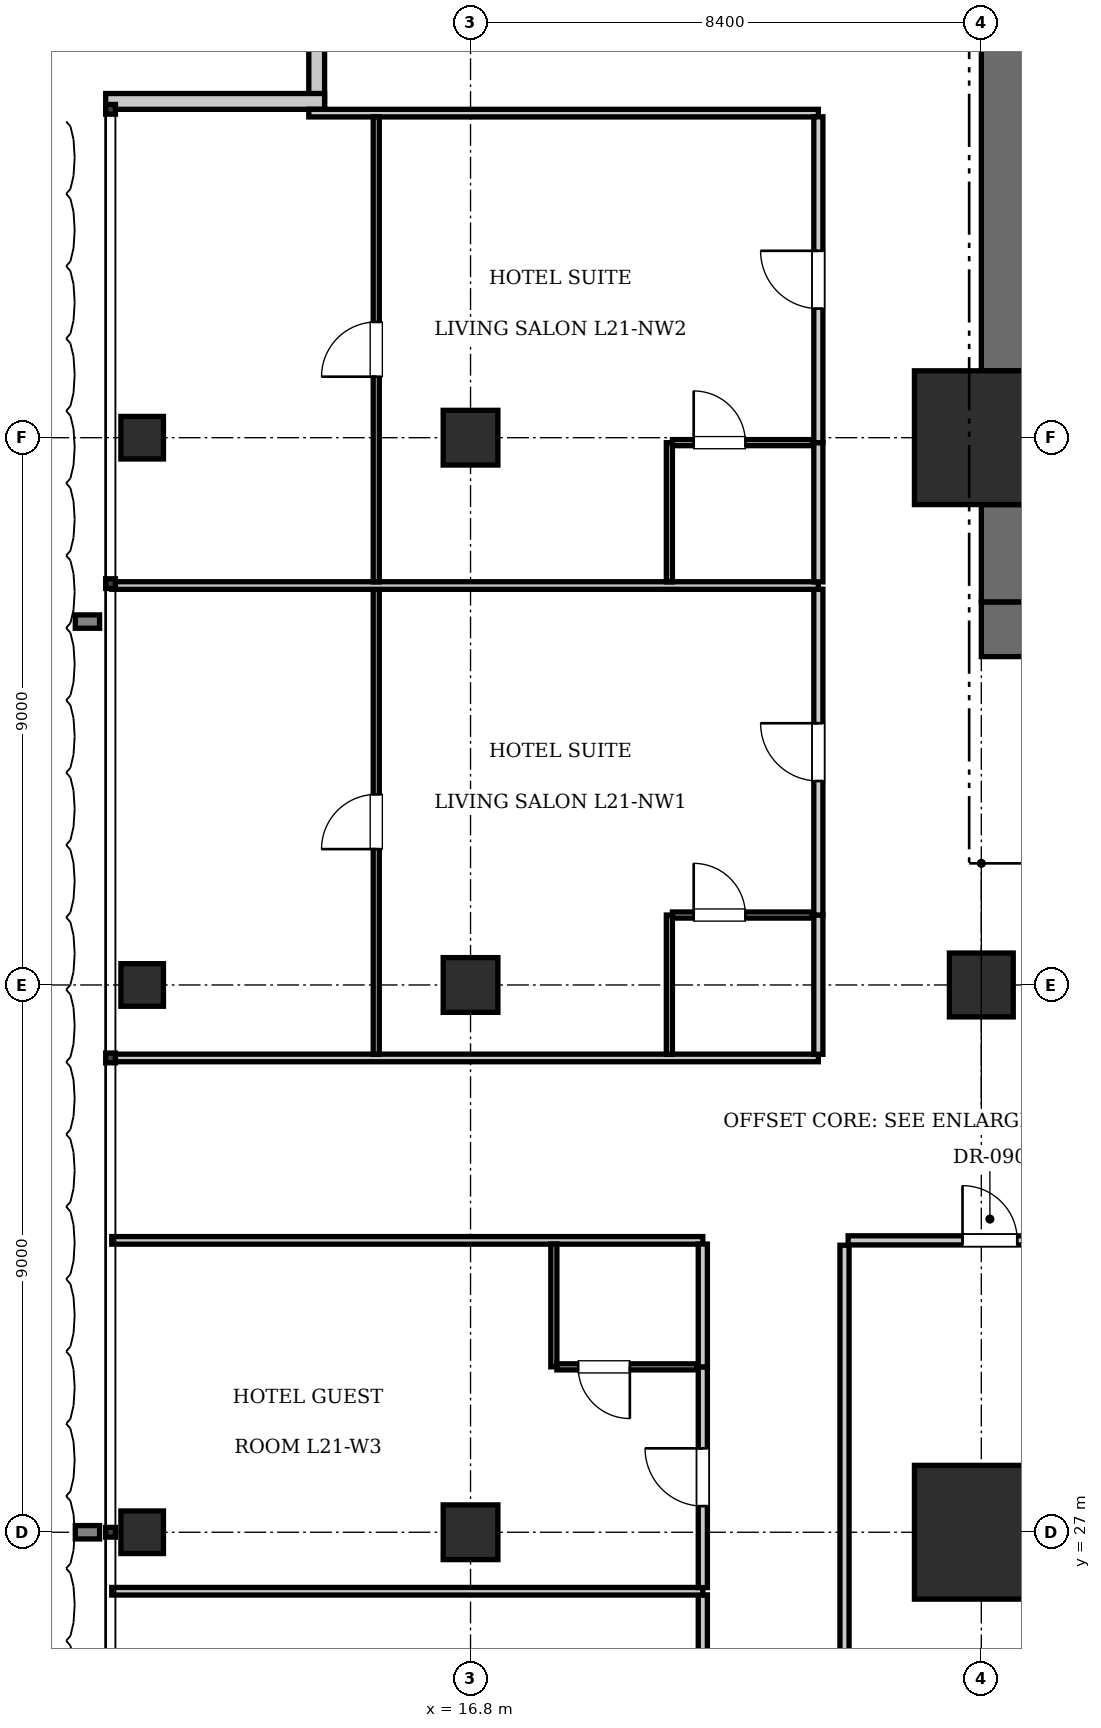
"""IFC4 building model, lengths in metres.
Left out: names, types, materials, properties, quantities, classifications, styles, units other than length and angle.
Written with IfcOpenShell. Run it as: python <this file> out.ifc"""

import sys

from ifc_helpers import new_model, si_unit, direction, frame, frame_2d, origin, origin_2d, place, context, subcontext, project, spatial, rectangle, i_section, extrude, element, fill, save


model = new_model("IFC4")
c1 = context("Model", 3, precision=1e-05, world=origin(), true_north=direction((0.0, 1.0)))
c2 = subcontext(c1, "Body", "Model", "MODEL_VIEW")
j1 = project(units=[si_unit("LENGTHUNIT", "METRE"), si_unit("PLANEANGLEUNIT", "RADIAN")], contexts=[c1])
p1 = place(None, origin())
s1 = spatial("IfcSite", under=j1, at=p1, CompositionType="ELEMENT")
p2 = place(p1, origin())
s2 = spatial("IfcBuilding", under=s1, at=p2, CompositionType="ELEMENT")
p3 = place(p2, frame((0.0, 0.0, 88.55)))
s3 = spatial("IfcBuildingStorey", under=s2, at=p3, CompositionType="ELEMENT", Elevation=88.55)
for number, where, z_axis, x_axis in (
    (1, (25.2, 27.0, 0.0), (0.0, 0.0, 1.0), (1.0, 0.0, 0.0)),
    (2, (25.2, 45.0, 0.0), (0.0, 0.0, 1.0), (1.0, 0.0, 0.0)),
):
    element("IfcColumn", number, at=place(p3, frame(where, z_axis=z_axis, x_axis=x_axis)), inside=s3, PredefinedType="COLUMN", context=c2, shape_type="SweptSolid", body=[
        extrude(rectangle(XDim=2.2, YDim=2.2, at=origin_2d()), origin(), (0.0, 0.0, 1.0), 3.85),
    ])
p4 = place(p3, frame((25.2, 41.85, 0.0), z_axis=(0.0, 0.0, 1.0), x_axis=(1.0, 0.0, 0.0)))
e3 = element("IfcWall", 3, at=p4, inside=s3, PredefinedType="SHEAR", context=c2, shape_type="SweptSolid", body=[
    extrude(rectangle(XDim=6.8, YDim=0.9, at=frame_2d((3.4, 0.0))), origin(), (0.0, 0.0, 1.0), 3.85),
])
p5 = place(p4, frame((1.65, 0.0, 0.0)))
e4 = element("IfcOpeningElement", 4, at=p5, cuts=e3, PredefinedType="OPENING", context=c2, shape_type="SweptSolid", body=[
    extrude(rectangle(XDim=1.15, YDim=2.15, at=frame_2d((0.575, 1.075))), frame((0.0, 0.46, 0.0), z_axis=(0.0, -1.0, 0.0), x_axis=(1.0, 0.0, 0.0)), (0.0, 0.0, 1.0), 0.92),
])
p6 = place(p4, frame((5.15, 0.0, 0.0)))
e5 = element("IfcOpeningElement", 5, at=p6, cuts=e3, PredefinedType="OPENING", context=c2, shape_type="SweptSolid", body=[
    extrude(rectangle(XDim=1.1, YDim=2.2, at=frame_2d((0.55, 1.1))), frame((0.0, 0.46, 0.0), z_axis=(0.0, -1.0, 0.0), x_axis=(1.0, 0.0, 0.0)), (0.0, 0.0, 1.0), 0.92),
])
p7 = place(p3, frame((25.65, 42.3, 0.0), z_axis=(0.0, 0.0, 1.0), x_axis=(0.0, 1.0, 0.0)))
e6 = element("IfcWall", 6, at=p7, inside=s3, PredefinedType="SHEAR", context=c2, shape_type="SweptSolid", body=[
    extrude(rectangle(XDim=1.6, YDim=0.9, at=frame_2d((0.8, 0.0))), origin(), (0.0, 0.0, 1.0), 3.85),
])
p8 = place(p3, frame((25.65, 46.1, 0.0), z_axis=(0.0, 0.0, 1.0), x_axis=(0.0, 1.0, 0.0)))
e7 = element("IfcWall", 7, at=p8, inside=s3, PredefinedType="SHEAR", context=c2, shape_type="SweptSolid", body=[
    extrude(rectangle(XDim=7.0, YDim=0.9, at=frame_2d((3.5, 0.0))), origin(), (0.0, 0.0, 1.0), 3.85),
])
p9 = place(p3, frame((25.2, 36.0, 0.0), z_axis=(0.0, 0.0, 1.0), x_axis=(1.0, 0.0, 0.0)))
e8 = element("IfcColumn", 8, at=p9, inside=s3, PredefinedType="COLUMN", context=c2, shape_type="SweptSolid", body=[
    extrude(rectangle(XDim=1.05, YDim=1.05, at=origin_2d()), origin(), (0.0, 0.0, 1.0), 3.85),
])
for number, where, z_axis, x_axis in (
    (9, (16.8, 27.0, 0.0), (0.0, 0.0, 1.0), (1.0, 0.0, 0.0)),
    (10, (16.8, 36.0, 0.0), (0.0, 0.0, 1.0), (1.0, 0.0, 0.0)),
    (11, (16.8, 45.0, 0.0), (0.0, 0.0, 1.0), (1.0, 0.0, 0.0)),
):
    element("IfcColumn", number, at=place(p3, frame(where, z_axis=z_axis, x_axis=x_axis)), inside=s3, PredefinedType="COLUMN", context=c2, shape_type="SweptSolid", body=[
        extrude(rectangle(XDim=0.9, YDim=0.9, at=origin_2d()), origin(), (0.0, 0.0, 1.0), 3.85),
    ])
for number, where, z_axis, x_axis in (
    (12, (11.4, 27.0, 0.0), (0.0, 0.0, 1.0), (1.0, 0.0, 0.0)),
    (13, (11.4, 36.0, 0.0), (0.0, 0.0, 1.0), (1.0, 0.0, 0.0)),
    (14, (11.4, 45.0, 0.0), (0.0, 0.0, 1.0), (1.0, 0.0, 0.0)),
):
    element("IfcColumn", number, at=place(p3, frame(where, z_axis=z_axis, x_axis=x_axis)), inside=s3, PredefinedType="COLUMN", context=c2, shape_type="SweptSolid", body=[
        extrude(i_section(OverallWidth=0.7, OverallDepth=0.7, WebThickness=0.028, FlangeThickness=0.044, at=origin_2d()), origin(), (0.0, 0.0, 1.0), 3.85),
    ])
p10 = place(p3, frame((14.27, 50.4, 0.0), z_axis=(0.0, 0.0, 1.0), x_axis=(0.0, 1.0, 0.0)))
e15 = element("IfcWall", 15, at=p10, inside=s3, PredefinedType="SOLIDWALL", context=c2, shape_type="SweptSolid", body=[
    extrude(rectangle(XDim=3.6, YDim=0.26, at=frame_2d((1.8, 0.0))), origin(), (0.0, 0.0, 1.0), 3.61),
])
p11 = place(p3, frame((10.8, 50.53, 0.0), z_axis=(0.0, 0.0, 1.0), x_axis=(1.0, 0.0, 0.0)))
e16 = element("IfcWall", 16, at=p11, inside=s3, PredefinedType="SOLIDWALL", context=c2, shape_type="SweptSolid", body=[
    extrude(rectangle(XDim=3.6, YDim=0.26, at=frame_2d((1.8, 0.0))), origin(), (0.0, 0.0, 1.0), 3.61),
])
p12 = place(p3, frame((22.95, 23.28, 0.0), z_axis=(0.0, 0.0, 1.0), x_axis=(0.0, 1.0, 0.0)))
e17 = element("IfcWall", 17, at=p12, inside=s3, PredefinedType="PARTITIONING", context=c2, shape_type="SweptSolid", body=[
    extrude(rectangle(XDim=8.44, YDim=0.15, at=frame_2d((4.22, 0.0))), origin(), (0.0, 0.0, 1.0), 3.61),
])
p13 = place(p3, frame((23.01, 31.8, 0.0), z_axis=(0.0, 0.0, 1.0), x_axis=(1.0, 0.0, 0.0)))
e18 = element("IfcWall", 18, at=p13, inside=s3, PredefinedType="PARTITIONING", context=c2, shape_type="SweptSolid", body=[
    extrude(rectangle(XDim=4.662, YDim=0.15, at=frame_2d((2.331, 0.0))), origin(), (0.0, 0.0, 1.0), 3.61),
])
p14 = place(p13, frame((1.881, 0.0, 0.0)))
e19 = element("IfcOpeningElement", 19, at=p14, cuts=e18, PredefinedType="OPENING", context=c2, shape_type="SweptSolid", body=[
    extrude(rectangle(XDim=0.9, YDim=2.1, at=frame_2d((0.45, 1.05))), frame((0.0, 0.085, 0.0), z_axis=(0.0, -1.0, 0.0), x_axis=(1.0, 0.0, 0.0)), (0.0, 0.0, 1.0), 0.17),
])
p15 = place(p3, frame((10.9, 31.8, 0.0), z_axis=(0.0, 0.0, 1.0), x_axis=(1.0, 0.0, 0.0)))
e20 = element("IfcWall", 20, at=p15, inside=s3, PredefinedType="PARTITIONING", context=c2, shape_type="SweptSolid", body=[
    extrude(rectangle(XDim=9.72, YDim=0.125, at=frame_2d((4.86, 0.0))), origin(), (0.0, 0.0, 1.0), 3.61),
])
p16 = place(p3, frame((20.62, 22.34, 0.0), z_axis=(0.0, 0.0, 1.0), x_axis=(0.0, 1.0, 0.0)))
e21 = element("IfcWall", 21, at=p16, inside=s3, PredefinedType="PARTITIONING", context=c2, shape_type="SweptSolid", body=[
    extrude(rectangle(XDim=3.63, YDim=0.15, at=frame_2d((1.815, 0.0))), origin(), (0.0, 0.0, 1.0), 3.61),
])
p17 = place(p16, frame((1.34, 0.0, 0.0)))
e22 = element("IfcOpeningElement", 22, at=p17, cuts=e21, PredefinedType="OPENING", context=c2, shape_type="SweptSolid", body=[
    extrude(rectangle(XDim=0.95, YDim=2.15, at=frame_2d((0.475, 1.075))), frame((0.0, 0.085, 0.0), z_axis=(0.0, -1.0, 0.0), x_axis=(1.0, 0.0, 0.0)), (0.0, 0.0, 1.0), 0.17),
])
p18 = place(p3, frame((10.9, 26.03, 0.0), z_axis=(0.0, 0.0, 1.0), x_axis=(1.0, 0.0, 0.0)))
e23 = element("IfcWall", 23, at=p18, inside=s3, PredefinedType="PARTITIONING", context=c2, shape_type="SweptSolid", body=[
    extrude(rectangle(XDim=9.72, YDim=0.125, at=frame_2d((4.86, 0.0))), origin(), (0.0, 0.0, 1.0), 3.61),
])
p19 = place(p3, frame((20.62, 26.09, 0.0), z_axis=(0.0, 0.0, 1.0), x_axis=(0.0, 1.0, 0.0)))
e24 = element("IfcWall", 24, at=p19, inside=s3, PredefinedType="PARTITIONING", context=c2, shape_type="SweptSolid", body=[
    extrude(rectangle(XDim=3.63, YDim=0.15, at=frame_2d((1.815, 0.0))), origin(), (0.0, 0.0, 1.0), 3.61),
])
p20 = place(p19, frame((1.34, 0.0, 0.0)))
e25 = element("IfcOpeningElement", 25, at=p20, cuts=e24, PredefinedType="OPENING", context=c2, shape_type="SweptSolid", body=[
    extrude(rectangle(XDim=0.95, YDim=2.15, at=frame_2d((0.475, 1.075))), frame((0.0, 0.085, 0.0), z_axis=(0.0, -1.0, 0.0), x_axis=(1.0, 0.0, 0.0)), (0.0, 0.0, 1.0), 0.17),
])
p21 = place(p3, frame((20.62, 29.72, 0.0), z_axis=(0.0, 0.0, 1.0), x_axis=(0.0, 1.0, 0.0)))
e26 = element("IfcWall", 26, at=p21, inside=s3, PredefinedType="PARTITIONING", context=c2, shape_type="SweptSolid", body=[
    extrude(rectangle(XDim=2.02, YDim=0.15, at=frame_2d((1.01, 0.0))), origin(), (0.0, 0.0, 1.0), 3.61),
])
p22 = place(p3, frame((18.17, 29.72, 0.0), z_axis=(0.0, 0.0, 1.0), x_axis=(0.0, 1.0, 0.0)))
e27 = element("IfcWall", 27, at=p22, inside=s3, PredefinedType="PARTITIONING", context=c2, shape_type="SweptSolid", body=[
    extrude(rectangle(XDim=2.02, YDim=0.1, at=frame_2d((1.01, 0.0))), origin(), (0.0, 0.0, 1.0), 3.61),
])
p23 = place(p3, frame((18.22, 29.72, 0.0), z_axis=(0.0, 0.0, 1.0), x_axis=(1.0, 0.0, 0.0)))
e28 = element("IfcWall", 28, at=p23, inside=s3, PredefinedType="PARTITIONING", context=c2, shape_type="SweptSolid", body=[
    extrude(rectangle(XDim=2.3, YDim=0.1, at=frame_2d((1.15, 0.0))), origin(), (0.0, 0.0, 1.0), 3.61),
])
p24 = place(p23, frame((0.35, 0.0, 0.0)))
e29 = element("IfcOpeningElement", 29, at=p24, cuts=e28, PredefinedType="OPENING", context=c2, shape_type="SweptSolid", body=[
    extrude(rectangle(XDim=0.85, YDim=2.1, at=frame_2d((0.425, 1.05))), frame((0.0, 0.06, 0.0), z_axis=(0.0, -1.0, 0.0), x_axis=(1.0, 0.0, 0.0)), (0.0, 0.0, 1.0), 0.12),
])
p25 = place(p3, frame((10.9, 34.8, 0.0), z_axis=(0.0, 0.0, 1.0), x_axis=(1.0, 0.0, 0.0)))
e30 = element("IfcWall", 30, at=p25, inside=s3, PredefinedType="PARTITIONING", context=c2, shape_type="SweptSolid", body=[
    extrude(rectangle(XDim=11.62, YDim=0.125, at=frame_2d((5.81, 0.0))), origin(), (0.0, 0.0, 1.0), 3.61),
])
p26 = place(p3, frame((14.14, 50.337, 0.0), z_axis=(0.0, 0.0, 1.0), x_axis=(1.0, 0.0, 0.0)))
e31 = element("IfcWall", 31, at=p26, inside=s3, PredefinedType="PARTITIONING", context=c2, shape_type="SweptSolid", body=[
    extrude(rectangle(XDim=8.38, YDim=0.125, at=frame_2d((4.19, 0.0))), origin(), (0.0, 0.0, 1.0), 3.61),
])
p27 = place(p3, frame((22.52, 34.86, 0.0), z_axis=(0.0, 0.0, 1.0), x_axis=(0.0, 1.0, 0.0)))
e32 = element("IfcWall", 32, at=p27, inside=s3, PredefinedType="PARTITIONING", context=c2, shape_type="SweptSolid", body=[
    extrude(rectangle(XDim=2.29, YDim=0.15, at=frame_2d((1.145, 0.0))), origin(), (0.0, 0.0, 1.0), 3.61),
])
p28 = place(p3, frame((22.52, 37.15, 0.0), z_axis=(0.0, 0.0, 1.0), x_axis=(0.0, 1.0, 0.0)))
e33 = element("IfcWall", 33, at=p28, inside=s3, PredefinedType="PARTITIONING", context=c2, shape_type="SweptSolid", body=[
    extrude(rectangle(XDim=5.359, YDim=0.15, at=frame_2d((2.679, 0.0))), origin(), (0.0, 0.0, 1.0), 3.61),
])
p29 = place(p28, frame((2.204, 0.0, 0.0)))
e34 = element("IfcOpeningElement", 34, at=p29, cuts=e33, PredefinedType="OPENING", context=c2, shape_type="SweptSolid", body=[
    extrude(rectangle(XDim=0.95, YDim=2.15, at=frame_2d((0.475, 1.075))), frame((0.0, 0.085, 0.0), z_axis=(0.0, -1.0, 0.0), x_axis=(1.0, 0.0, 0.0)), (0.0, 0.0, 1.0), 0.17),
])
p30 = place(p3, frame((20.07, 34.86, 0.0), z_axis=(0.0, 0.0, 1.0), x_axis=(0.0, 1.0, 0.0)))
e35 = element("IfcWall", 35, at=p30, inside=s3, PredefinedType="PARTITIONING", context=c2, shape_type="SweptSolid", body=[
    extrude(rectangle(XDim=2.29, YDim=0.1, at=frame_2d((1.145, 0.0))), origin(), (0.0, 0.0, 1.0), 3.61),
])
p31 = place(p3, frame((20.12, 37.15, 0.0), z_axis=(0.0, 0.0, 1.0), x_axis=(1.0, 0.0, 0.0)))
e36 = element("IfcWall", 36, at=p31, inside=s3, PredefinedType="PARTITIONING", context=c2, shape_type="SweptSolid", body=[
    extrude(rectangle(XDim=2.3, YDim=0.1, at=frame_2d((1.15, 0.0))), origin(), (0.0, 0.0, 1.0), 3.61),
])
p32 = place(p31, frame((0.35, 0.0, 0.0)))
e37 = element("IfcOpeningElement", 37, at=p32, cuts=e36, PredefinedType="OPENING", context=c2, shape_type="SweptSolid", body=[
    extrude(rectangle(XDim=0.85, YDim=2.1, at=frame_2d((0.425, 1.05))), frame((0.0, 0.06, 0.0), z_axis=(0.0, -1.0, 0.0), x_axis=(1.0, 0.0, 0.0)), (0.0, 0.0, 1.0), 0.12),
])
p33 = place(p3, frame((15.25, 34.86, 0.0), z_axis=(0.0, 0.0, 1.0), x_axis=(0.0, 1.0, 0.0)))
e38 = element("IfcWall", 38, at=p33, inside=s3, PredefinedType="PARTITIONING", context=c2, shape_type="SweptSolid", body=[
    extrude(rectangle(XDim=7.649, YDim=0.1, at=frame_2d((3.824, 0.0))), origin(), (0.0, 0.0, 1.0), 3.61),
])
p34 = place(p33, frame((3.374, 0.0, 0.0)))
e39 = element("IfcOpeningElement", 39, at=p34, cuts=e38, PredefinedType="OPENING", context=c2, shape_type="SweptSolid", body=[
    extrude(rectangle(XDim=0.9, YDim=2.1, at=frame_2d((0.45, 1.05))), frame((0.0, 0.06, 0.0), z_axis=(0.0, -1.0, 0.0), x_axis=(1.0, 0.0, 0.0)), (0.0, 0.0, 1.0), 0.12),
])
p35 = place(p3, frame((10.9, 42.569, 0.0), z_axis=(0.0, 0.0, 1.0), x_axis=(1.0, 0.0, 0.0)))
e40 = element("IfcWall", 40, at=p35, inside=s3, PredefinedType="PARTITIONING", context=c2, shape_type="SweptSolid", body=[
    extrude(rectangle(XDim=11.62, YDim=0.125, at=frame_2d((5.81, 0.0))), origin(), (0.0, 0.0, 1.0), 3.61),
])
p36 = place(p3, frame((22.52, 42.629, 0.0), z_axis=(0.0, 0.0, 1.0), x_axis=(0.0, 1.0, 0.0)))
e41 = element("IfcWall", 41, at=p36, inside=s3, PredefinedType="PARTITIONING", context=c2, shape_type="SweptSolid", body=[
    extrude(rectangle(XDim=2.29, YDim=0.15, at=frame_2d((1.145, 0.0))), origin(), (0.0, 0.0, 1.0), 3.61),
])
p37 = place(p3, frame((22.52, 44.919, 0.0), z_axis=(0.0, 0.0, 1.0), x_axis=(0.0, 1.0, 0.0)))
e42 = element("IfcWall", 42, at=p37, inside=s3, PredefinedType="PARTITIONING", context=c2, shape_type="SweptSolid", body=[
    extrude(rectangle(XDim=5.359, YDim=0.15, at=frame_2d((2.679, 0.0))), origin(), (0.0, 0.0, 1.0), 3.61),
])
p38 = place(p37, frame((2.204, 0.0, 0.0)))
e43 = element("IfcOpeningElement", 43, at=p38, cuts=e42, PredefinedType="OPENING", context=c2, shape_type="SweptSolid", body=[
    extrude(rectangle(XDim=0.95, YDim=2.15, at=frame_2d((0.475, 1.075))), frame((0.0, 0.085, 0.0), z_axis=(0.0, -1.0, 0.0), x_axis=(1.0, 0.0, 0.0)), (0.0, 0.0, 1.0), 0.17),
])
p39 = place(p3, frame((20.07, 42.629, 0.0), z_axis=(0.0, 0.0, 1.0), x_axis=(0.0, 1.0, 0.0)))
e44 = element("IfcWall", 44, at=p39, inside=s3, PredefinedType="PARTITIONING", context=c2, shape_type="SweptSolid", body=[
    extrude(rectangle(XDim=2.29, YDim=0.1, at=frame_2d((1.145, 0.0))), origin(), (0.0, 0.0, 1.0), 3.61),
])
p40 = place(p3, frame((20.12, 44.919, 0.0), z_axis=(0.0, 0.0, 1.0), x_axis=(1.0, 0.0, 0.0)))
e45 = element("IfcWall", 45, at=p40, inside=s3, PredefinedType="PARTITIONING", context=c2, shape_type="SweptSolid", body=[
    extrude(rectangle(XDim=2.3, YDim=0.1, at=frame_2d((1.15, 0.0))), origin(), (0.0, 0.0, 1.0), 2.999),
])
p41 = place(p40, frame((0.35, 0.0, 0.0)))
e46 = element("IfcOpeningElement", 46, at=p41, cuts=e45, PredefinedType="OPENING", context=c2, shape_type="SweptSolid", body=[
    extrude(rectangle(XDim=0.85, YDim=2.1, at=frame_2d((0.425, 1.05))), frame((0.0, 0.06, 0.0), z_axis=(0.0, -1.0, 0.0), x_axis=(1.0, 0.0, 0.0)), (0.0, 0.0, 1.0), 0.12),
])
p42 = place(p3, frame((15.25, 42.629, 0.0), z_axis=(0.0, 0.0, 1.0), x_axis=(0.0, 1.0, 0.0)))
e47 = element("IfcWall", 47, at=p42, inside=s3, PredefinedType="PARTITIONING", context=c2, shape_type="SweptSolid", body=[
    extrude(rectangle(XDim=7.649, YDim=0.1, at=frame_2d((3.824, 0.0))), origin(), (0.0, 0.0, 1.0), 3.61),
])
p43 = place(p42, frame((3.375, 0.0, 0.0)))
e48 = element("IfcOpeningElement", 48, at=p43, cuts=e47, PredefinedType="OPENING", context=c2, shape_type="SweptSolid", body=[
    extrude(rectangle(XDim=0.9, YDim=2.1, at=frame_2d((0.45, 1.05))), frame((0.0, 0.06, 0.0), z_axis=(0.0, -1.0, 0.0), x_axis=(1.0, 0.0, 0.0)), (0.0, 0.0, 1.0), 0.12),
])
p44 = place(p14, origin())
e49 = element("IfcDoor", 49, at=p44, inside=s3, OperationType="SINGLE_SWING_LEFT", PredefinedType="DOOR", context=c2, shape_type="SweptSolid", body=[
    extrude(rectangle(XDim=0.9, YDim=2.1, at=frame_2d((0.45, 1.05))), frame((0.0, 0.025, 0.0), z_axis=(0.0, -1.0, 0.0), x_axis=(1.0, 0.0, 0.0)), (0.0, 0.0, 1.0), 0.05),
])
fill(e19, e49)
p45 = place(p24, frame((0.85, 0.0, 0.0), z_axis=(0.0, 0.0, 1.0), x_axis=(-1.0, 0.0, 0.0)))
e50 = element("IfcDoor", 50, at=p45, inside=s3, OperationType="SINGLE_SWING_LEFT", PredefinedType="DOOR", context=c2, shape_type="SweptSolid", body=[
    extrude(rectangle(XDim=0.85, YDim=2.1, at=frame_2d((0.425, 1.05))), frame((0.0, 0.025, 0.0), z_axis=(0.0, -1.0, 0.0), x_axis=(1.0, 0.0, 0.0)), (0.0, 0.0, 1.0), 0.05),
])
fill(e29, e50)
p46 = place(p20, origin())
e51 = element("IfcDoor", 51, at=p46, inside=s3, OperationType="SINGLE_SWING_RIGHT", PredefinedType="DOOR", context=c2, shape_type="SweptSolid", body=[
    extrude(rectangle(XDim=0.95, YDim=2.15, at=frame_2d((0.475, 1.075))), frame((0.0, 0.025, 0.0), z_axis=(0.0, -1.0, 0.0), x_axis=(1.0, 0.0, 0.0)), (0.0, 0.0, 1.0), 0.05),
])
fill(e25, e51)
p47 = place(p32, origin())
e52 = element("IfcDoor", 52, at=p47, inside=s3, OperationType="SINGLE_SWING_LEFT", PredefinedType="DOOR", context=c2, shape_type="SweptSolid", body=[
    extrude(rectangle(XDim=0.85, YDim=2.1, at=frame_2d((0.425, 1.05))), frame((0.0, 0.025, 0.0), z_axis=(0.0, -1.0, 0.0), x_axis=(1.0, 0.0, 0.0)), (0.0, 0.0, 1.0), 0.05),
])
fill(e37, e52)
p48 = place(p29, origin())
e53 = element("IfcDoor", 53, at=p48, inside=s3, OperationType="SINGLE_SWING_RIGHT", PredefinedType="DOOR", context=c2, shape_type="SweptSolid", body=[
    extrude(rectangle(XDim=0.95, YDim=2.15, at=frame_2d((0.475, 1.075))), frame((0.0, 0.025, 0.0), z_axis=(0.0, -1.0, 0.0), x_axis=(1.0, 0.0, 0.0)), (0.0, 0.0, 1.0), 0.05),
])
fill(e34, e53)
p49 = place(p34, origin())
e54 = element("IfcDoor", 54, at=p49, inside=s3, OperationType="SINGLE_SWING_LEFT", PredefinedType="DOOR", context=c2, shape_type="SweptSolid", body=[
    extrude(rectangle(XDim=0.9, YDim=2.1, at=frame_2d((0.45, 1.05))), frame((0.0, 0.025, 0.0), z_axis=(0.0, -1.0, 0.0), x_axis=(1.0, 0.0, 0.0)), (0.0, 0.0, 1.0), 0.05),
])
fill(e39, e54)
p50 = place(p41, origin())
e55 = element("IfcDoor", 55, at=p50, inside=s3, OperationType="SINGLE_SWING_LEFT", PredefinedType="DOOR", context=c2, shape_type="SweptSolid", body=[
    extrude(rectangle(XDim=0.85, YDim=2.1, at=frame_2d((0.425, 1.05))), frame((0.0, 0.025, 0.0), z_axis=(0.0, -1.0, 0.0), x_axis=(1.0, 0.0, 0.0)), (0.0, 0.0, 1.0), 0.05),
])
fill(e46, e55)
p51 = place(p38, origin())
e56 = element("IfcDoor", 56, at=p51, inside=s3, OperationType="SINGLE_SWING_RIGHT", PredefinedType="DOOR", context=c2, shape_type="SweptSolid", body=[
    extrude(rectangle(XDim=0.95, YDim=2.15, at=frame_2d((0.475, 1.075))), frame((0.0, 0.025, 0.0), z_axis=(0.0, -1.0, 0.0), x_axis=(1.0, 0.0, 0.0)), (0.0, 0.0, 1.0), 0.05),
])
fill(e43, e56)
p52 = place(p43, origin())
e57 = element("IfcDoor", 57, at=p52, inside=s3, OperationType="SINGLE_SWING_LEFT", PredefinedType="DOOR", context=c2, shape_type="SweptSolid", body=[
    extrude(rectangle(XDim=0.9, YDim=2.1, at=frame_2d((0.45, 1.05))), frame((0.0, 0.025, 0.0), z_axis=(0.0, -1.0, 0.0), x_axis=(1.0, 0.0, 0.0)), (0.0, 0.0, 1.0), 0.05),
])
fill(e48, e57)
save(model, sys.argv[1])
